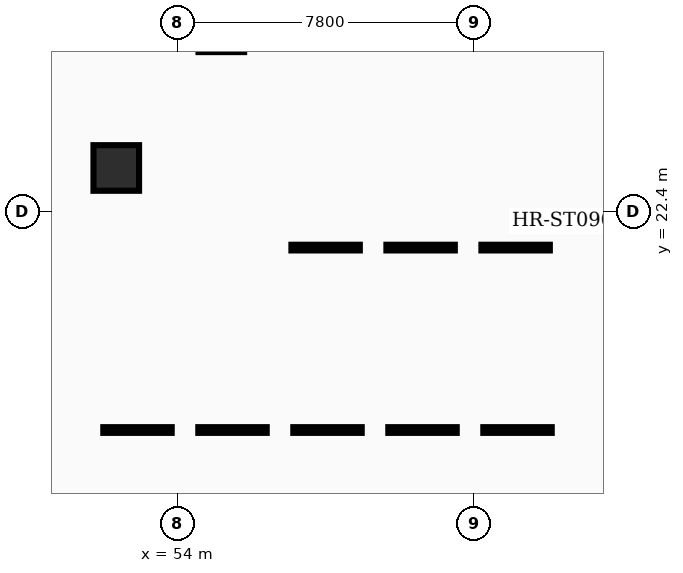
"""IFC4 building model, lengths in metres.
Left out: names, types, materials, properties, quantities, classifications, styles, units other than length and angle.
Written with IfcOpenShell. Run it as: python <this file> out.ifc"""

import sys

from ifc_helpers import new_model, si_unit, direction, frame, origin, origin_2d, place, context, subcontext, project, spatial, hollow_rectangle, extrude, element, save


model = new_model("IFC4")
c1 = context("Model", 3, precision=1e-05, world=origin(), true_north=direction((0.0, 1.0)))
c2 = subcontext(c1, "Body", "Model", "MODEL_VIEW")
j1 = project(units=[si_unit("LENGTHUNIT", "METRE"), si_unit("PLANEANGLEUNIT", "RADIAN")], contexts=[c1])
p1 = place(None, origin())
s1 = spatial("IfcSite", under=j1, at=p1, CompositionType="ELEMENT")
p2 = place(p1, origin())
s2 = spatial("IfcBuilding", under=s1, at=p2, CompositionType="ELEMENT")
p3 = place(p2, frame((0.0, 0.0, -4.08)))
s3 = spatial("IfcBuildingStorey", under=s2, at=p3, CompositionType="ELEMENT", Elevation=-4.08)
for number, where, z_axis, x_axis in (
    (1, (52.391, 23.545, 0.0), (0.0, 0.0, 1.0), (1.0, 0.0, 0.0)),
    (2, (55.156, 27.194, 0.0), (0.0, 0.0, 1.0), (1.0, 0.0, 0.0)),
):
    element("IfcColumn", number, at=place(p3, frame(where, z_axis=z_axis, x_axis=x_axis)), inside=s3, PredefinedType="COLUMN", context=c2, shape_type="SweptSolid", body=[
        extrude(hollow_rectangle(XDim=1.2, YDim=1.2, WallThickness=0.06, at=origin_2d()), origin(), (0.0, 0.0, 1.0), 3.76),
    ])
save(model, sys.argv[1])
